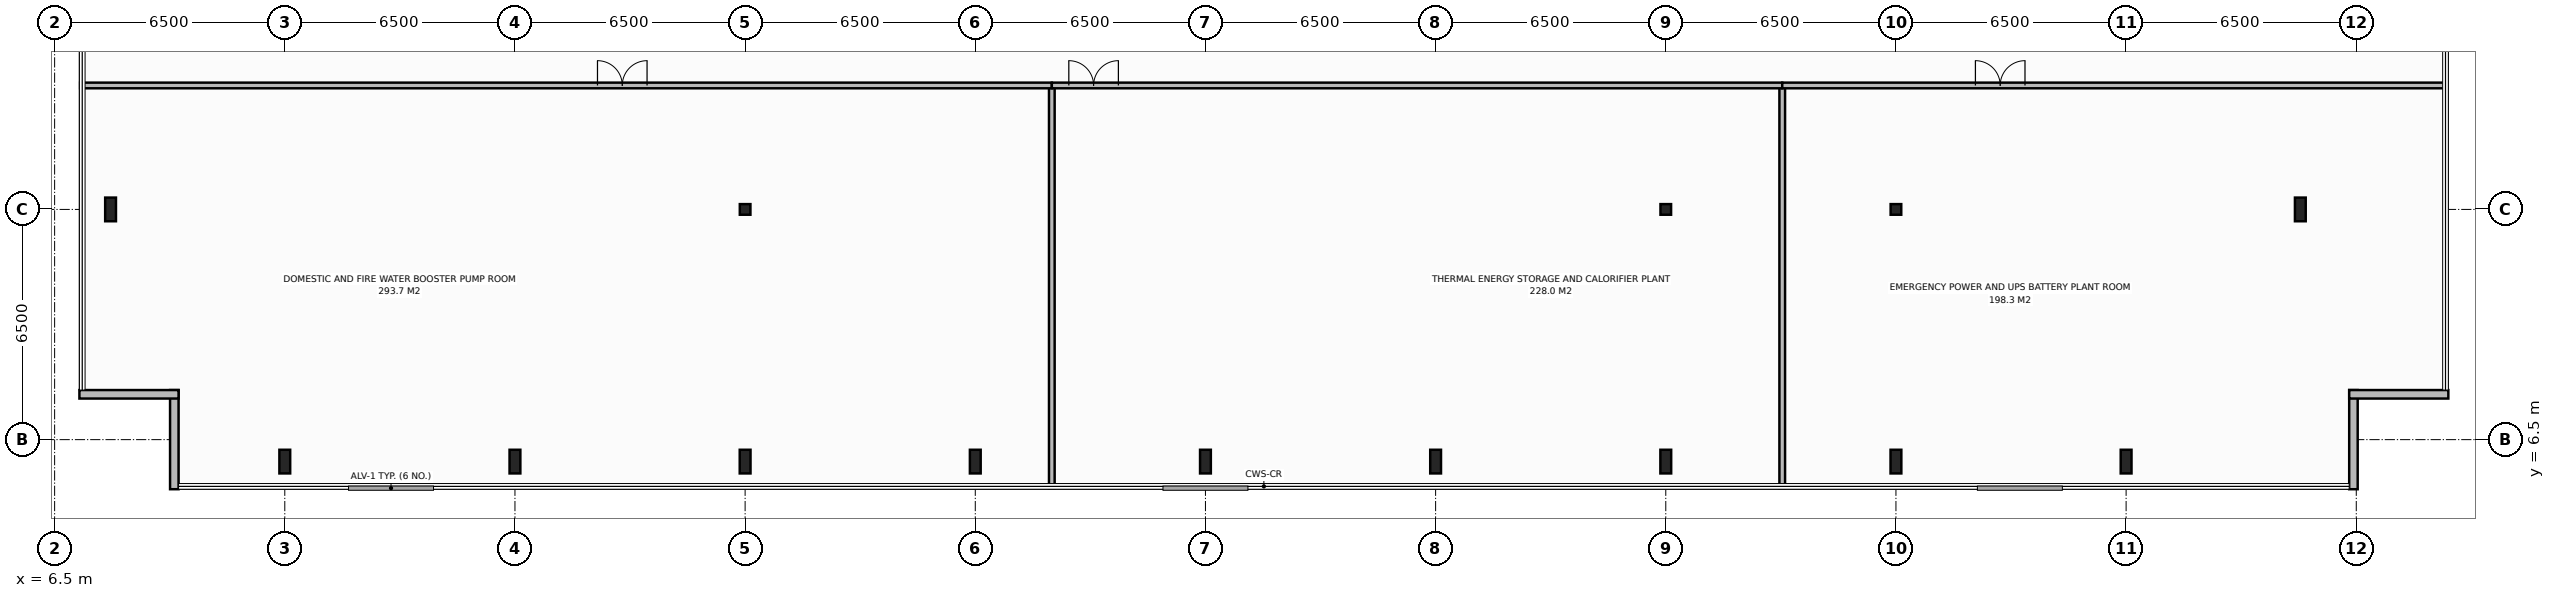
"""IFC4 building model, lengths in metres.
Left out: names, types, materials, properties, quantities, classifications, styles, units other than length and angle.
Written with IfcOpenShell. Run it as: python <this file> out.ifc"""

import sys

from ifc_helpers import new_model, si_unit, direction, frame, frame_2d, origin, origin_2d, place, context, subcontext, project, spatial, rectangle, i_section, extrude, element, fill, save


model = new_model("IFC4")
c1 = context("Model", 3, precision=1e-05, world=origin(), true_north=direction((0.0, 1.0)))
c2 = subcontext(c1, "Body", "Model", "MODEL_VIEW")
j1 = project(units=[si_unit("LENGTHUNIT", "METRE"), si_unit("PLANEANGLEUNIT", "RADIAN")], contexts=[c1])
p1 = place(None, origin())
s1 = spatial("IfcSite", under=j1, at=p1, CompositionType="ELEMENT")
p2 = place(p1, origin())
s2 = spatial("IfcBuilding", under=s1, at=p2, CompositionType="ELEMENT")
p3 = place(p2, frame((0.0, 0.0, 315.4)))
s3 = spatial("IfcBuildingStorey", under=s2, at=p3, CompositionType="ELEMENT", Elevation=315.4)
for number, where, z_axis, x_axis in (
    (1, (58.5, 13.0, 0.0), (0.0, 0.0, 1.0), (1.0, 0.0, 0.0)),
    (2, (26.0, 13.0, 0.0), (0.0, 0.0, 1.0), (1.0, 0.0, 0.0)),
    (3, (52.0, 13.0, 0.0), (0.0, 0.0, 1.0), (1.0, 0.0, 0.0)),
):
    element("IfcColumn", number, at=place(p3, frame(where, z_axis=z_axis, x_axis=x_axis)), inside=s3, PredefinedType="COLUMN", context=c2, shape_type="SweptSolid", body=[
        extrude(i_section(OverallWidth=0.3, OverallDepth=0.3, WebThickness=0.011, FlangeThickness=0.019, at=origin_2d()), origin(), (0.0, 0.0, 1.0), 5.0),
    ])
for number, where, z_axis, x_axis in (
    (4, (13.0, 5.88, 0.0), (0.0, 0.0, 1.0), (1.0, 0.0, 0.0)),
    (5, (19.5, 5.88, 0.0), (0.0, 0.0, 1.0), (1.0, 0.0, 0.0)),
    (6, (26.0, 5.88, 0.0), (0.0, 0.0, 1.0), (1.0, 0.0, 0.0)),
    (7, (32.5, 5.88, 0.0), (0.0, 0.0, 1.0), (1.0, 0.0, 0.0)),
    (8, (39.0, 5.88, 0.0), (0.0, 0.0, 1.0), (1.0, 0.0, 0.0)),
    (9, (45.5, 5.88, 0.0), (0.0, 0.0, 1.0), (1.0, 0.0, 0.0)),
    (10, (52.0, 5.88, 0.0), (0.0, 0.0, 1.0), (1.0, 0.0, 0.0)),
    (11, (58.5, 5.88, 0.0), (0.0, 0.0, 1.0), (1.0, 0.0, 0.0)),
    (12, (65.0, 5.88, 0.0), (0.0, 0.0, 1.0), (1.0, 0.0, 0.0)),
    (13, (8.08, 13.0, 0.0), (0.0, 0.0, 1.0), (1.0, 0.0, 0.0)),
    (14, (69.92, 13.0, 0.0), (0.0, 0.0, 1.0), (1.0, 0.0, 0.0)),
):
    element("IfcColumn", number, at=place(p3, frame(where, z_axis=z_axis, x_axis=x_axis)), inside=s3, PredefinedType="COLUMN", context=c2, shape_type="SweptSolid", body=[
        extrude(i_section(OverallWidth=0.305, OverallDepth=0.668, WebThickness=0.021, FlangeThickness=0.04, at=origin_2d()), origin(), (0.0, 0.0, 1.0), 5.0),
    ])
p4 = place(p3, frame((9.88, 5.1, 0.0), z_axis=(0.0, 0.0, 1.0), x_axis=(0.0, 1.0, 0.0)))
e15 = element("IfcWall", 15, at=p4, inside=s3, PredefinedType="STANDARD", context=c2, shape_type="SweptSolid", body=[
    extrude(rectangle(XDim=2.8, YDim=0.24, at=frame_2d((1.4, 0.0))), origin(), (0.0, 0.0, 1.0), 4.58),
])
p5 = place(p3, frame((10.0, 7.78, 0.0), z_axis=(0.0, 0.0, 1.0), x_axis=(-1.0, 0.0, 0.0)))
e16 = element("IfcWall", 16, at=p5, inside=s3, PredefinedType="STANDARD", context=c2, shape_type="SweptSolid", body=[
    extrude(rectangle(XDim=2.8, YDim=0.24, at=frame_2d((1.4, 0.0))), origin(), (0.0, 0.0, 1.0), 4.58),
])
p6 = place(p3, frame((71.42, 7.9, 0.0), z_axis=(0.0, 0.0, 1.0), x_axis=(0.0, -1.0, 0.0)))
e17 = element("IfcWall", 17, at=p6, inside=s3, PredefinedType="STANDARD", context=c2, shape_type="SweptSolid", body=[
    extrude(rectangle(XDim=2.8, YDim=0.24, at=frame_2d((1.4, 0.0))), origin(), (0.0, 0.0, 1.0), 4.58),
])
p7 = place(p3, frame((74.1, 7.78, 0.0), z_axis=(0.0, 0.0, 1.0), x_axis=(-1.0, 0.0, 0.0)))
e18 = element("IfcWall", 18, at=p7, inside=s3, PredefinedType="STANDARD", context=c2, shape_type="SweptSolid", body=[
    extrude(rectangle(XDim=2.8, YDim=0.24, at=frame_2d((1.4, 0.0))), origin(), (0.0, 0.0, 1.0), 4.58),
])
p8 = place(p3, frame((34.661, 5.12, 0.0), z_axis=(0.0, 0.0, 1.0), x_axis=(0.0, 1.0, 0.0)))
e19 = element("IfcWall", 19, at=p8, inside=s3, PredefinedType="STANDARD", context=c2, shape_type="SweptSolid", body=[
    extrude(rectangle(XDim=11.38, YDim=0.16, at=frame_2d((5.69, 0.0))), origin(), (0.0, 0.0, 1.0), 4.58),
])
p9 = place(p3, frame((7.22, 16.5, 0.0), z_axis=(0.0, 0.0, 1.0), x_axis=(1.0, 0.0, 0.0)))
e20 = element("IfcWall", 20, at=p9, inside=s3, PredefinedType="STANDARD", context=c2, shape_type="SweptSolid", body=[
    extrude(rectangle(XDim=27.441, YDim=0.16, at=frame_2d((13.721, 0.0))), origin(), (0.0, 0.0, 1.0), 4.58),
])
p10 = place(p9, frame((14.611, 0.0, 0.0)))
e21 = element("IfcOpeningElement", 21, at=p10, cuts=e20, PredefinedType="OPENING", context=c2, shape_type="SweptSolid", body=[
    extrude(rectangle(XDim=1.4, YDim=2.2, at=frame_2d((0.7, 1.1))), frame((0.0, 0.09, 0.0), z_axis=(0.0, -1.0, 0.0), x_axis=(1.0, 0.0, 0.0)), (0.0, 0.0, 1.0), 0.18),
])
p11 = place(p3, frame((55.289, 5.12, 0.0), z_axis=(0.0, 0.0, 1.0), x_axis=(0.0, 1.0, 0.0)))
e22 = element("IfcWall", 22, at=p11, inside=s3, PredefinedType="STANDARD", context=c2, shape_type="SweptSolid", body=[
    extrude(rectangle(XDim=11.38, YDim=0.16, at=frame_2d((5.69, 0.0))), origin(), (0.0, 0.0, 1.0), 4.58),
])
p12 = place(p3, frame((34.661, 16.5, 0.0), z_axis=(0.0, 0.0, 1.0), x_axis=(1.0, 0.0, 0.0)))
e23 = element("IfcWall", 23, at=p12, inside=s3, PredefinedType="STANDARD", context=c2, shape_type="SweptSolid", body=[
    extrude(rectangle(XDim=20.627, YDim=0.16, at=frame_2d((10.314, 0.0))), origin(), (0.0, 0.0, 1.0), 4.58),
])
p13 = place(p12, frame((0.48, 0.0, 0.0)))
e24 = element("IfcOpeningElement", 24, at=p13, cuts=e23, PredefinedType="OPENING", context=c2, shape_type="SweptSolid", body=[
    extrude(rectangle(XDim=1.4, YDim=2.2, at=frame_2d((0.7, 1.1))), frame((0.0, 0.09, 0.0), z_axis=(0.0, -1.0, 0.0), x_axis=(1.0, 0.0, 0.0)), (0.0, 0.0, 1.0), 0.18),
])
p14 = place(p3, frame((55.289, 16.5, 0.0), z_axis=(0.0, 0.0, 1.0), x_axis=(1.0, 0.0, 0.0)))
e25 = element("IfcWall", 25, at=p14, inside=s3, PredefinedType="STANDARD", context=c2, shape_type="SweptSolid", body=[
    extrude(rectangle(XDim=18.791, YDim=0.16, at=frame_2d((9.396, 0.0))), origin(), (0.0, 0.0, 1.0), 4.58),
])
p15 = place(p14, frame((5.456, 0.0, 0.0)))
e26 = element("IfcOpeningElement", 26, at=p15, cuts=e25, PredefinedType="OPENING", context=c2, shape_type="SweptSolid", body=[
    extrude(rectangle(XDim=1.4, YDim=2.2, at=frame_2d((0.7, 1.1))), frame((0.0, 0.09, 0.0), z_axis=(0.0, -1.0, 0.0), x_axis=(1.0, 0.0, 0.0)), (0.0, 0.0, 1.0), 0.18),
])
p16 = place(p10, origin())
e27 = element("IfcDoor", 27, at=p16, inside=s3, OperationType="DOUBLE_DOOR_SINGLE_SWING", PredefinedType="DOOR", context=c2, shape_type="SweptSolid", body=[
    extrude(rectangle(XDim=1.4, YDim=2.2, at=frame_2d((0.7, 1.1))), frame((0.0, 0.025, 0.0), z_axis=(0.0, -1.0, 0.0), x_axis=(1.0, 0.0, 0.0)), (0.0, 0.0, 1.0), 0.05),
])
fill(e21, e27)
p17 = place(p13, origin())
e28 = element("IfcDoor", 28, at=p17, inside=s3, OperationType="DOUBLE_DOOR_SINGLE_SWING", PredefinedType="DOOR", context=c2, shape_type="SweptSolid", body=[
    extrude(rectangle(XDim=1.4, YDim=2.2, at=frame_2d((0.7, 1.1))), frame((0.0, 0.025, 0.0), z_axis=(0.0, -1.0, 0.0), x_axis=(1.0, 0.0, 0.0)), (0.0, 0.0, 1.0), 0.05),
])
fill(e24, e28)
p18 = place(p15, origin())
e29 = element("IfcDoor", 29, at=p18, inside=s3, OperationType="DOUBLE_DOOR_SINGLE_SWING", PredefinedType="DOOR", context=c2, shape_type="SweptSolid", body=[
    extrude(rectangle(XDim=1.4, YDim=2.2, at=frame_2d((0.7, 1.1))), frame((0.0, 0.025, 0.0), z_axis=(0.0, -1.0, 0.0), x_axis=(1.0, 0.0, 0.0)), (0.0, 0.0, 1.0), 0.05),
])
fill(e26, e29)
save(model, sys.argv[1])
